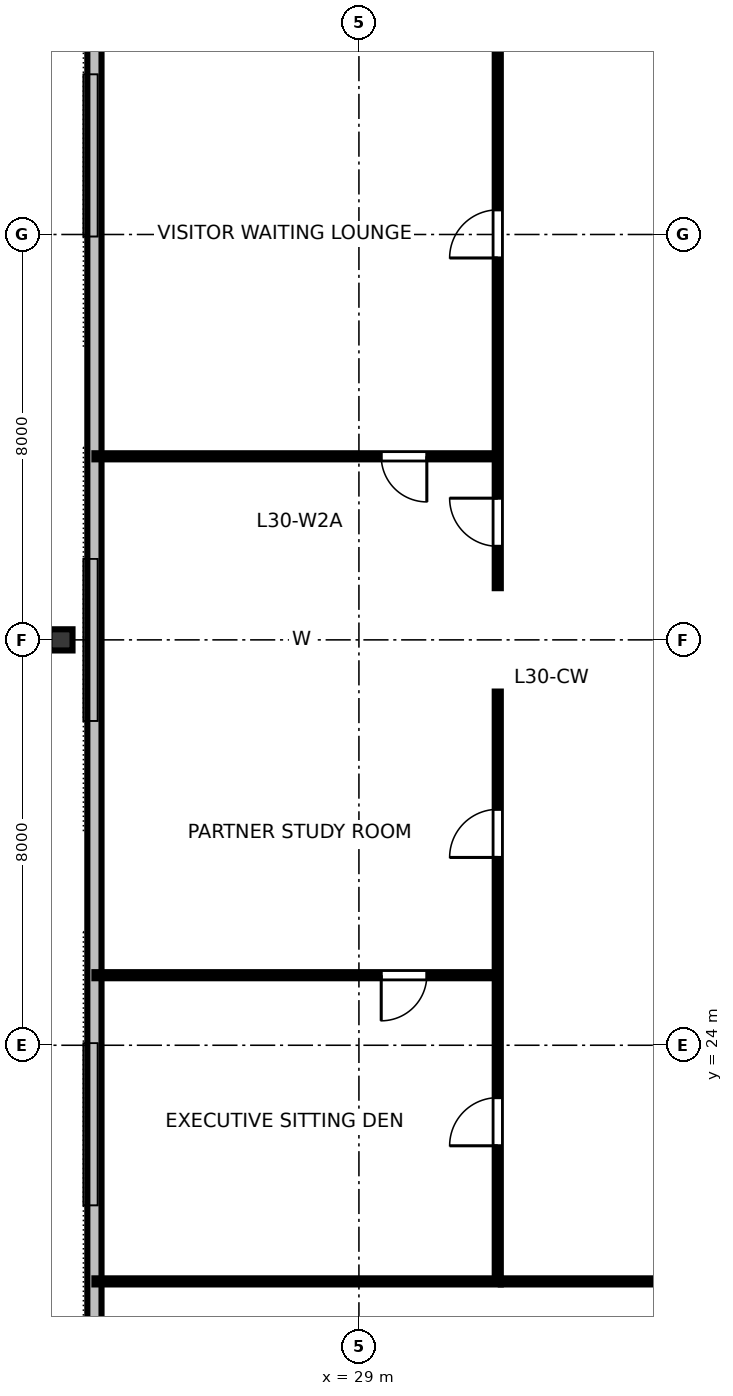
"""IFC4 building model, lengths in metres.
Left out: names, types, materials, properties, quantities, classifications, styles, units other than length and angle.
Written with IfcOpenShell. Run it as: python <this file> out.ifc"""

import sys

from ifc_helpers import new_model, si_unit, direction, frame, frame_2d, origin, origin_2d, place, context, subcontext, project, spatial, rectangle, i_section, extrude, element, fill, save


model = new_model("IFC4")
c1 = context("Model", 3, precision=1e-05, world=origin(), true_north=direction((0.0, 1.0)))
c2 = subcontext(c1, "Body", "Model", "MODEL_VIEW")
j1 = project(units=[si_unit("LENGTHUNIT", "METRE"), si_unit("PLANEANGLEUNIT", "RADIAN")], contexts=[c1])
p1 = place(None, origin())
s1 = spatial("IfcSite", under=j1, at=p1, CompositionType="ELEMENT")
p2 = place(p1, origin())
s2 = spatial("IfcBuilding", under=s1, at=p2, CompositionType="ELEMENT")
p3 = place(p2, frame((0.0, 0.0, 116.8)))
s3 = spatial("IfcBuildingStorey", under=s2, at=p3, CompositionType="ELEMENT", Elevation=116.8)
p4 = place(p3, frame((23.12, 32.0, 0.0), z_axis=(0.0, 0.0, 1.0), x_axis=(0.0, 1.0, 0.0)))
e1 = element("IfcColumn", 1, at=p4, inside=s3, PredefinedType="COLUMN", context=c2, shape_type="SweptSolid", body=[
    extrude(i_section(OverallWidth=0.418, OverallDepth=0.455, WebThickness=0.042, FlangeThickness=0.068, FilletRadius=0.025, at=origin_2d()), origin(), (0.0, 0.0, 1.0), 3.358),
])
p5 = place(p3, frame((23.78, 47.24, 0.0), z_axis=(0.0, 0.0, 1.0), x_axis=(0.0, -1.0, 0.0)))
e2 = element("IfcWall", 2, at=p5, inside=s3, PredefinedType="STANDARD", context=c2, shape_type="SweptSolid", body=[
    extrude(rectangle(XDim=30.48, YDim=0.28, at=frame_2d((15.24, 0.0))), origin(), (0.0, 0.0, 1.0), 3.36),
])
p6 = place(p3, frame((31.8, 19.34, 0.0), z_axis=(0.0, 0.0, 1.0), x_axis=(1.0, 0.0, 0.0)))
e3 = element("IfcWall", 3, at=p6, inside=s3, PredefinedType="PARTITIONING", context=c2, shape_type="SweptSolid", body=[
    extrude(rectangle(XDim=28.4, YDim=0.12, at=frame_2d((14.2, 0.0))), origin(), (0.0, 0.0, 1.0), 2.64),
])
p7 = place(p6, frame((7.878, 0.0, 0.0)))
e4 = element("IfcOpeningElement", 4, at=p7, cuts=e3, PredefinedType="OPENING", context=c2, shape_type="SweptSolid", body=[
    extrude(rectangle(XDim=0.95, YDim=2.15, at=frame_2d((0.475, 1.075))), frame((0.0, 0.07, 0.0), z_axis=(0.0, -1.0, 0.0), x_axis=(1.0, 0.0, 0.0)), (0.0, 0.0, 1.0), 0.14),
])
p8 = place(p6, frame((21.938, 0.0, 0.0)))
e5 = element("IfcOpeningElement", 5, at=p8, cuts=e3, PredefinedType="OPENING", context=c2, shape_type="SweptSolid", body=[
    extrude(rectangle(XDim=0.95, YDim=2.15, at=frame_2d((0.475, 1.075))), frame((0.0, 0.07, 0.0), z_axis=(0.0, -1.0, 0.0), x_axis=(1.0, 0.0, 0.0)), (0.0, 0.0, 1.0), 0.14),
])
p9 = place(p3, frame((31.74, 25.383, 0.0), z_axis=(0.0, 0.0, 1.0), x_axis=(-1.0, 0.0, 0.0)))
e6 = element("IfcWall", 6, at=p9, inside=s3, PredefinedType="PARTITIONING", context=c2, shape_type="SweptSolid", body=[
    extrude(rectangle(XDim=7.96, YDim=0.12, at=frame_2d((3.98, 0.0))), origin(), (0.0, 0.0, 1.0), 2.64),
])
p10 = place(p9, frame((1.4, 0.0, 0.0)))
e7 = element("IfcOpeningElement", 7, at=p10, cuts=e6, PredefinedType="OPENING", context=c2, shape_type="SweptSolid", body=[
    extrude(rectangle(XDim=0.9, YDim=2.15, at=frame_2d((0.45, 1.075))), frame((0.0, 0.07, 0.0), z_axis=(0.0, -1.0, 0.0), x_axis=(1.0, 0.0, 0.0)), (0.0, 0.0, 1.0), 0.14),
])
p11 = place(p3, frame((31.74, 35.623, 0.0), z_axis=(0.0, 0.0, 1.0), x_axis=(-1.0, 0.0, 0.0)))
e8 = element("IfcWall", 8, at=p11, inside=s3, PredefinedType="PARTITIONING", context=c2, shape_type="SweptSolid", body=[
    extrude(rectangle(XDim=7.96, YDim=0.12, at=frame_2d((3.98, 0.0))), origin(), (0.0, 0.0, 1.0), 2.64),
])
p12 = place(p11, frame((1.4, 0.0, 0.0)))
e9 = element("IfcOpeningElement", 9, at=p12, cuts=e8, PredefinedType="OPENING", context=c2, shape_type="SweptSolid", body=[
    extrude(rectangle(XDim=0.9, YDim=2.15, at=frame_2d((0.45, 1.075))), frame((0.0, 0.07, 0.0), z_axis=(0.0, -1.0, 0.0), x_axis=(1.0, 0.0, 0.0)), (0.0, 0.0, 1.0), 0.14),
])
p13 = place(p3, frame((31.74, 19.4, 0.0), z_axis=(0.0, 0.0, 1.0), x_axis=(0.0, 1.0, 0.0)))
e10 = element("IfcWall", 10, at=p13, inside=s3, PredefinedType="PARTITIONING", context=c2, shape_type="SweptSolid", body=[
    extrude(rectangle(XDim=11.58, YDim=0.12, at=frame_2d((5.79, 0.0))), origin(), (0.0, 0.0, 1.0), 2.64),
])
p14 = place(p13, frame((2.616, 0.0, 0.0)))
e11 = element("IfcOpeningElement", 11, at=p14, cuts=e10, PredefinedType="OPENING", context=c2, shape_type="SweptSolid", body=[
    extrude(rectangle(XDim=0.95, YDim=2.15, at=frame_2d((0.475, 1.075))), frame((0.0, 0.07, 0.0), z_axis=(0.0, -1.0, 0.0), x_axis=(1.0, 0.0, 0.0)), (0.0, 0.0, 1.0), 0.14),
])
p15 = place(p13, frame((8.306, 0.0, 0.0)))
e12 = element("IfcOpeningElement", 12, at=p15, cuts=e10, PredefinedType="OPENING", context=c2, shape_type="SweptSolid", body=[
    extrude(rectangle(XDim=0.95, YDim=2.15, at=frame_2d((0.475, 1.075))), frame((0.0, 0.07, 0.0), z_axis=(0.0, -1.0, 0.0), x_axis=(1.0, 0.0, 0.0)), (0.0, 0.0, 1.0), 0.14),
])
p16 = place(p3, frame((31.74, 33.02, 0.0), z_axis=(0.0, 0.0, 1.0), x_axis=(0.0, 1.0, 0.0)))
e13 = element("IfcWall", 13, at=p16, inside=s3, PredefinedType="PARTITIONING", context=c2, shape_type="SweptSolid", body=[
    extrude(rectangle(XDim=11.58, YDim=0.12, at=frame_2d((5.79, 0.0))), origin(), (0.0, 0.0, 1.0), 2.64),
])
p17 = place(p16, frame((0.826, 0.0, 0.0)))
e14 = element("IfcOpeningElement", 14, at=p17, cuts=e13, PredefinedType="OPENING", context=c2, shape_type="SweptSolid", body=[
    extrude(rectangle(XDim=0.95, YDim=2.15, at=frame_2d((0.475, 1.075))), frame((0.0, 0.07, 0.0), z_axis=(0.0, -1.0, 0.0), x_axis=(1.0, 0.0, 0.0)), (0.0, 0.0, 1.0), 0.14),
])
p18 = place(p16, frame((6.516, 0.0, 0.0)))
e15 = element("IfcOpeningElement", 15, at=p18, cuts=e13, PredefinedType="OPENING", context=c2, shape_type="SweptSolid", body=[
    extrude(rectangle(XDim=0.95, YDim=2.15, at=frame_2d((0.475, 1.075))), frame((0.0, 0.07, 0.0), z_axis=(0.0, -1.0, 0.0), x_axis=(1.0, 0.0, 0.0)), (0.0, 0.0, 1.0), 0.14),
])
p19 = place(p3, frame((31.8, 19.34, 0.0), z_axis=(0.0, 0.0, 1.0), x_axis=(-1.0, 0.0, 0.0)))
e16 = element("IfcWall", 16, at=p19, inside=s3, PredefinedType="PARTITIONING", context=c2, shape_type="SweptSolid", body=[
    extrude(rectangle(XDim=8.02, YDim=0.12, at=frame_2d((4.01, 0.0))), origin(), (0.0, 0.0, 1.0), 2.64),
])
p20 = place(p10, origin())
e17 = element("IfcDoor", 17, at=p20, inside=s3, OperationType="SINGLE_SWING_RIGHT", PredefinedType="DOOR", context=c2, shape_type="SweptSolid", body=[
    extrude(rectangle(XDim=0.9, YDim=2.15, at=frame_2d((0.45, 1.075))), frame((0.0, 0.025, 0.0), z_axis=(0.0, -1.0, 0.0), x_axis=(1.0, 0.0, 0.0)), (0.0, 0.0, 1.0), 0.05),
])
fill(e7, e17)
p21 = place(p12, origin())
e18 = element("IfcDoor", 18, at=p21, inside=s3, OperationType="SINGLE_SWING_LEFT", PredefinedType="DOOR", context=c2, shape_type="SweptSolid", body=[
    extrude(rectangle(XDim=0.9, YDim=2.15, at=frame_2d((0.45, 1.075))), frame((0.0, 0.025, 0.0), z_axis=(0.0, -1.0, 0.0), x_axis=(1.0, 0.0, 0.0)), (0.0, 0.0, 1.0), 0.05),
])
fill(e9, e18)
p22 = place(p14, origin())
e19 = element("IfcDoor", 19, at=p22, inside=s3, OperationType="SINGLE_SWING_LEFT", PredefinedType="DOOR", context=c2, shape_type="SweptSolid", body=[
    extrude(rectangle(XDim=0.95, YDim=2.15, at=frame_2d((0.475, 1.075))), frame((0.0, 0.025, 0.0), z_axis=(0.0, -1.0, 0.0), x_axis=(1.0, 0.0, 0.0)), (0.0, 0.0, 1.0), 0.05),
])
fill(e11, e19)
p23 = place(p15, origin())
e20 = element("IfcDoor", 20, at=p23, inside=s3, OperationType="SINGLE_SWING_LEFT", PredefinedType="DOOR", context=c2, shape_type="SweptSolid", body=[
    extrude(rectangle(XDim=0.95, YDim=2.15, at=frame_2d((0.475, 1.075))), frame((0.0, 0.025, 0.0), z_axis=(0.0, -1.0, 0.0), x_axis=(1.0, 0.0, 0.0)), (0.0, 0.0, 1.0), 0.05),
])
fill(e12, e20)
p24 = place(p17, origin())
e21 = element("IfcDoor", 21, at=p24, inside=s3, OperationType="SINGLE_SWING_RIGHT", PredefinedType="DOOR", context=c2, shape_type="SweptSolid", body=[
    extrude(rectangle(XDim=0.95, YDim=2.15, at=frame_2d((0.475, 1.075))), frame((0.0, 0.025, 0.0), z_axis=(0.0, -1.0, 0.0), x_axis=(1.0, 0.0, 0.0)), (0.0, 0.0, 1.0), 0.05),
])
fill(e14, e21)
p25 = place(p18, origin())
e22 = element("IfcDoor", 22, at=p25, inside=s3, OperationType="SINGLE_SWING_LEFT", PredefinedType="DOOR", context=c2, shape_type="SweptSolid", body=[
    extrude(rectangle(XDim=0.95, YDim=2.15, at=frame_2d((0.475, 1.075))), frame((0.0, 0.025, 0.0), z_axis=(0.0, -1.0, 0.0), x_axis=(1.0, 0.0, 0.0)), (0.0, 0.0, 1.0), 0.05),
])
fill(e15, e22)
save(model, sys.argv[1])
